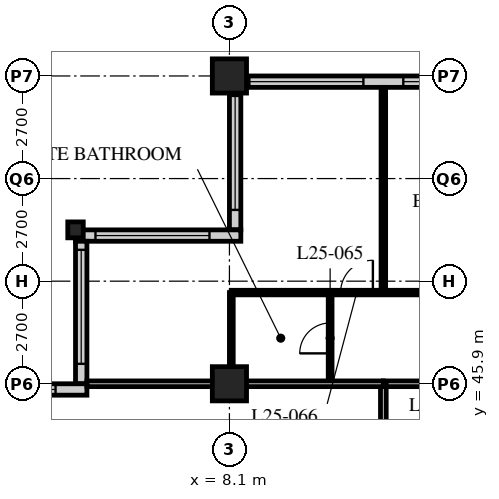
"""IFC4 building model, lengths in metres.
Left out: names, types, materials, properties, quantities, classifications, styles, units other than length and angle.
Written with IfcOpenShell. Run it as: python <this file> out.ifc"""

import sys

from ifc_helpers import new_model, si_unit, direction, frame, frame_2d, origin, origin_2d, place, context, subcontext, project, spatial, rectangle, hollow_rectangle, i_section, extrude, element, fill, save


model = new_model("IFC4")
c1 = context("Model", 3, precision=1e-05, world=origin(), true_north=direction((0.0, 1.0)))
c2 = subcontext(c1, "Body", "Model", "MODEL_VIEW")
j1 = project(units=[si_unit("LENGTHUNIT", "METRE"), si_unit("PLANEANGLEUNIT", "RADIAN")], contexts=[c1])
p1 = place(None, origin())
s1 = spatial("IfcSite", under=j1, at=p1, CompositionType="ELEMENT")
p2 = place(p1, origin())
s2 = spatial("IfcBuilding", under=s1, at=p2, CompositionType="ELEMENT")
p3 = place(p2, frame((0.0, 0.0, 103.4)))
s3 = spatial("IfcBuildingStorey", under=s2, at=p3, CompositionType="ELEMENT", Elevation=103.4)
p4 = place(p3, frame((4.05, 49.95, 0.0), z_axis=(0.0, 0.0, 1.0), x_axis=(1.0, 0.0, 0.0)))
e1 = element("IfcColumn", 1, at=p4, inside=s3, PredefinedType="COLUMN", context=c2, shape_type="SweptSolid", body=[
    extrude(i_section(OverallWidth=0.407, OverallDepth=0.419, WebThickness=0.031, FlangeThickness=0.049, FilletRadius=0.015, at=origin_2d()), origin(), (0.0, 0.0, 1.0), 3.4),
])
p5 = place(p3, frame((8.1, 45.9, 0.0), z_axis=(0.0, 0.0, 1.0), x_axis=(1.0, 0.0, 0.0)))
e2 = element("IfcColumn", 2, at=p5, inside=s3, PredefinedType="COLUMN", context=c2, shape_type="SweptSolid", body=[
    extrude(hollow_rectangle(XDim=0.9, YDim=0.9, WallThickness=0.1, at=origin_2d()), origin(), (0.0, 0.0, 1.0), 3.4),
])
p6 = place(p3, frame((8.1, 54.0, 0.0), z_axis=(0.0, 0.0, 1.0), x_axis=(1.0, 0.0, 0.0)))
e3 = element("IfcColumn", 3, at=p6, inside=s3, PredefinedType="COLUMN", context=c2, shape_type="SweptSolid", body=[
    extrude(hollow_rectangle(XDim=0.9, YDim=0.9, WallThickness=0.09, at=origin_2d()), origin(), (0.0, 0.0, 1.0), 3.4),
])
p7 = place(p3, frame((48.3, 53.85, 0.0), z_axis=(0.0, 0.0, 1.0), x_axis=(-1.0, 0.0, 0.0)))
e4 = element("IfcWall", 4, at=p7, inside=s3, PredefinedType="SOLIDWALL", context=c2, shape_type="SweptSolid", body=[
    extrude(rectangle(XDim=40.2, YDim=0.3, at=frame_2d((20.1, 0.0))), origin(), (0.0, 0.0, 1.0), 3.19),
])
p8 = place(p7, frame((0.225, 0.0, 0.9)))
e5 = element("IfcOpeningElement", 5, at=p8, cuts=e4, PredefinedType="OPENING", context=c2, shape_type="SweptSolid", body=[
    extrude(rectangle(XDim=3.0, YDim=2.0, at=frame_2d((1.5, 1.0))), frame((0.0, 0.16, 0.0), z_axis=(0.0, -1.0, 0.0), x_axis=(1.0, 0.0, 0.0)), (0.0, 0.0, 1.0), 0.32),
])
p9 = place(p7, frame((4.275, 0.0, 0.9)))
e6 = element("IfcOpeningElement", 6, at=p9, cuts=e4, PredefinedType="OPENING", context=c2, shape_type="SweptSolid", body=[
    extrude(rectangle(XDim=3.0, YDim=2.0, at=frame_2d((1.5, 1.0))), frame((0.0, 0.16, 0.0), z_axis=(0.0, -1.0, 0.0), x_axis=(1.0, 0.0, 0.0)), (0.0, 0.0, 1.0), 0.32),
])
p10 = place(p7, frame((8.325, 0.0, 0.9)))
e7 = element("IfcOpeningElement", 7, at=p10, cuts=e4, PredefinedType="OPENING", context=c2, shape_type="SweptSolid", body=[
    extrude(rectangle(XDim=3.0, YDim=2.0, at=frame_2d((1.5, 1.0))), frame((0.0, 0.16, 0.0), z_axis=(0.0, -1.0, 0.0), x_axis=(1.0, 0.0, 0.0)), (0.0, 0.0, 1.0), 0.32),
])
p11 = place(p7, frame((12.375, 0.0, 0.9)))
e8 = element("IfcOpeningElement", 8, at=p11, cuts=e4, PredefinedType="OPENING", context=c2, shape_type="SweptSolid", body=[
    extrude(rectangle(XDim=3.0, YDim=2.0, at=frame_2d((1.5, 1.0))), frame((0.0, 0.16, 0.0), z_axis=(0.0, -1.0, 0.0), x_axis=(1.0, 0.0, 0.0)), (0.0, 0.0, 1.0), 0.32),
])
p12 = place(p7, frame((16.425, 0.0, 0.9)))
e9 = element("IfcOpeningElement", 9, at=p12, cuts=e4, PredefinedType="OPENING", context=c2, shape_type="SweptSolid", body=[
    extrude(rectangle(XDim=3.0, YDim=2.0, at=frame_2d((1.5, 1.0))), frame((0.0, 0.16, 0.0), z_axis=(0.0, -1.0, 0.0), x_axis=(1.0, 0.0, 0.0)), (0.0, 0.0, 1.0), 0.32),
])
p13 = place(p7, frame((20.475, 0.0, 0.9)))
e10 = element("IfcOpeningElement", 10, at=p13, cuts=e4, PredefinedType="OPENING", context=c2, shape_type="SweptSolid", body=[
    extrude(rectangle(XDim=3.0, YDim=2.0, at=frame_2d((1.5, 1.0))), frame((0.0, 0.16, 0.0), z_axis=(0.0, -1.0, 0.0), x_axis=(1.0, 0.0, 0.0)), (0.0, 0.0, 1.0), 0.32),
])
p14 = place(p7, frame((24.525, 0.0, 0.9)))
e11 = element("IfcOpeningElement", 11, at=p14, cuts=e4, PredefinedType="OPENING", context=c2, shape_type="SweptSolid", body=[
    extrude(rectangle(XDim=3.0, YDim=2.0, at=frame_2d((1.5, 1.0))), frame((0.0, 0.16, 0.0), z_axis=(0.0, -1.0, 0.0), x_axis=(1.0, 0.0, 0.0)), (0.0, 0.0, 1.0), 0.32),
])
p15 = place(p7, frame((28.575, 0.0, 0.9)))
e12 = element("IfcOpeningElement", 12, at=p15, cuts=e4, PredefinedType="OPENING", context=c2, shape_type="SweptSolid", body=[
    extrude(rectangle(XDim=3.0, YDim=2.0, at=frame_2d((1.5, 1.0))), frame((0.0, 0.16, 0.0), z_axis=(0.0, -1.0, 0.0), x_axis=(1.0, 0.0, 0.0)), (0.0, 0.0, 1.0), 0.32),
])
p16 = place(p7, frame((32.625, 0.0, 0.9)))
e13 = element("IfcOpeningElement", 13, at=p16, cuts=e4, PredefinedType="OPENING", context=c2, shape_type="SweptSolid", body=[
    extrude(rectangle(XDim=3.0, YDim=2.0, at=frame_2d((1.5, 1.0))), frame((0.0, 0.16, 0.0), z_axis=(0.0, -1.0, 0.0), x_axis=(1.0, 0.0, 0.0)), (0.0, 0.0, 1.0), 0.32),
])
p17 = place(p7, frame((36.675, 0.0, 0.9)))
e14 = element("IfcOpeningElement", 14, at=p17, cuts=e4, PredefinedType="OPENING", context=c2, shape_type="SweptSolid", body=[
    extrude(rectangle(XDim=3.0, YDim=2.0, at=frame_2d((1.5, 1.0))), frame((0.0, 0.16, 0.0), z_axis=(0.0, -1.0, 0.0), x_axis=(1.0, 0.0, 0.0)), (0.0, 0.0, 1.0), 0.32),
])
p18 = place(p3, frame((8.25, 53.7, 0.0), z_axis=(0.0, 0.0, 1.0), x_axis=(0.0, -1.0, 0.0)))
e15 = element("IfcWall", 15, at=p18, inside=s3, PredefinedType="SOLIDWALL", context=c2, shape_type="SweptSolid", body=[
    extrude(rectangle(XDim=3.75, YDim=0.3, at=frame_2d((1.875, 0.0))), origin(), (0.0, 0.0, 1.0), 2.64),
])
p19 = place(p18, frame((0.225, 0.0, 0.9)))
e16 = element("IfcOpeningElement", 16, at=p19, cuts=e15, PredefinedType="OPENING", context=c2, shape_type="SweptSolid", body=[
    extrude(rectangle(XDim=3.0, YDim=1.5, at=frame_2d((1.5, 0.75))), frame((0.0, 0.16, 0.0), z_axis=(0.0, -1.0, 0.0), x_axis=(1.0, 0.0, 0.0)), (0.0, 0.0, 1.0), 0.32),
])
p20 = place(p3, frame((8.4, 49.8, 0.0), z_axis=(0.0, 0.0, 1.0), x_axis=(-1.0, 0.0, 0.0)))
e17 = element("IfcWall", 17, at=p20, inside=s3, PredefinedType="SOLIDWALL", context=c2, shape_type="SweptSolid", body=[
    extrude(rectangle(XDim=4.35, YDim=0.3, at=frame_2d((2.175, 0.0))), origin(), (0.0, 0.0, 1.0), 3.19),
])
p21 = place(p20, frame((0.825, 0.0, 0.9)))
e18 = element("IfcOpeningElement", 18, at=p21, cuts=e17, PredefinedType="OPENING", context=c2, shape_type="SweptSolid", body=[
    extrude(rectangle(XDim=3.0, YDim=1.5, at=frame_2d((1.5, 0.75))), frame((0.0, 0.16, 0.0), z_axis=(0.0, -1.0, 0.0), x_axis=(1.0, 0.0, 0.0)), (0.0, 0.0, 1.0), 0.32),
])
p22 = place(p3, frame((4.2, 49.65, 0.0), z_axis=(0.0, 0.0, 1.0), x_axis=(0.0, -1.0, 0.0)))
e19 = element("IfcWall", 19, at=p22, inside=s3, PredefinedType="SOLIDWALL", context=c2, shape_type="SweptSolid", body=[
    extrude(rectangle(XDim=3.75, YDim=0.3, at=frame_2d((1.875, 0.0))), origin(), (0.0, 0.0, 1.0), 3.19),
])
p23 = place(p22, frame((0.225, 0.0, 0.9)))
e20 = element("IfcOpeningElement", 20, at=p23, cuts=e19, PredefinedType="OPENING", context=c2, shape_type="SweptSolid", body=[
    extrude(rectangle(XDim=3.0, YDim=1.5, at=frame_2d((1.5, 0.75))), frame((0.0, 0.16, 0.0), z_axis=(0.0, -1.0, 0.0), x_axis=(1.0, 0.0, 0.0)), (0.0, 0.0, 1.0), 0.32),
])
p24 = place(p3, frame((4.35, 45.75, 0.0), z_axis=(0.0, 0.0, 1.0), x_axis=(-1.0, 0.0, 0.0)))
e21 = element("IfcWall", 21, at=p24, inside=s3, PredefinedType="SOLIDWALL", context=c2, shape_type="SweptSolid", body=[
    extrude(rectangle(XDim=4.35, YDim=0.3, at=frame_2d((2.175, 0.0))), origin(), (0.0, 0.0, 1.0), 3.19),
])
p25 = place(p24, frame((0.825, 0.0, 0.9)))
e22 = element("IfcOpeningElement", 22, at=p25, cuts=e21, PredefinedType="OPENING", context=c2, shape_type="SweptSolid", body=[
    extrude(rectangle(XDim=3.0, YDim=1.5, at=frame_2d((1.5, 0.75))), frame((0.0, 0.16, 0.0), z_axis=(0.0, -1.0, 0.0), x_axis=(1.0, 0.0, 0.0)), (0.0, 0.0, 1.0), 0.32),
])
p26 = place(p3, frame((12.15, 45.9, 0.0), z_axis=(0.0, 0.0, 1.0), x_axis=(1.0, 0.0, 0.0)))
e23 = element("IfcWall", 23, at=p26, inside=s3, PredefinedType="PARTITIONING", context=c2, shape_type="SweptSolid", body=[
    extrude(rectangle(XDim=32.4, YDim=0.15, at=frame_2d((16.2, 0.0))), origin(), (0.0, 0.0, 1.0), 2.578),
])
p27 = place(p26, frame((9.5, 0.0, 0.0)))
e24 = element("IfcOpeningElement", 24, at=p27, cuts=e23, PredefinedType="OPENING", context=c2, shape_type="SweptSolid", body=[
    extrude(rectangle(XDim=1.0, YDim=2.1, at=frame_2d((0.5, 1.05))), frame((0.0, 0.085, 0.0), z_axis=(0.0, -1.0, 0.0), x_axis=(1.0, 0.0, 0.0)), (0.0, 0.0, 1.0), 0.17),
])
p28 = place(p26, frame((17.6, 0.0, 0.0)))
e25 = element("IfcOpeningElement", 25, at=p28, cuts=e23, PredefinedType="OPENING", context=c2, shape_type="SweptSolid", body=[
    extrude(rectangle(XDim=1.0, YDim=2.1, at=frame_2d((0.5, 1.05))), frame((0.0, 0.085, 0.0), z_axis=(0.0, -1.0, 0.0), x_axis=(1.0, 0.0, 0.0)), (0.0, 0.0, 1.0), 0.17),
])
p29 = place(p26, frame((25.7, 0.0, 0.0)))
e26 = element("IfcOpeningElement", 26, at=p29, cuts=e23, PredefinedType="OPENING", context=c2, shape_type="SweptSolid", body=[
    extrude(rectangle(XDim=1.0, YDim=2.1, at=frame_2d((0.5, 1.05))), frame((0.0, 0.085, 0.0), z_axis=(0.0, -1.0, 0.0), x_axis=(1.0, 0.0, 0.0)), (0.0, 0.0, 1.0), 0.17),
])
p30 = place(p26, frame((29.875, 0.0, 0.0)))
e27 = element("IfcOpeningElement", 27, at=p30, cuts=e23, PredefinedType="OPENING", context=c2, shape_type="SweptSolid", body=[
    extrude(rectangle(XDim=1.0, YDim=2.1, at=frame_2d((0.5, 1.05))), frame((0.0, 0.085, 0.0), z_axis=(0.0, -1.0, 0.0), x_axis=(1.0, 0.0, 0.0)), (0.0, 0.0, 1.0), 0.17),
])
p31 = place(p26, frame((1.525, 0.0, 0.0)))
e28 = element("IfcOpeningElement", 28, at=p31, cuts=e23, PredefinedType="OPENING", context=c2, shape_type="SweptSolid", body=[
    extrude(rectangle(XDim=1.0, YDim=2.1, at=frame_2d((0.5, 1.05))), frame((0.0, 0.085, 0.0), z_axis=(0.0, -1.0, 0.0), x_axis=(1.0, 0.0, 0.0)), (0.0, 0.0, 1.0), 0.17),
])
p32 = place(p3, frame((12.15, 21.6, 0.0), z_axis=(0.0, 0.0, 1.0), x_axis=(0.0, 1.0, 0.0)))
e29 = element("IfcWall", 29, at=p32, inside=s3, PredefinedType="PARTITIONING", context=c2, shape_type="SweptSolid", body=[
    extrude(rectangle(XDim=24.3, YDim=0.15, at=frame_2d((12.15, 0.0))), origin(), (0.0, 0.0, 1.0), 3.19),
])
p33 = place(p32, frame((5.45, 0.0, 0.0)))
e30 = element("IfcOpeningElement", 30, at=p33, cuts=e29, PredefinedType="OPENING", context=c2, shape_type="SweptSolid", body=[
    extrude(rectangle(XDim=1.0, YDim=2.1, at=frame_2d((0.5, 1.05))), frame((0.0, 0.085, 0.0), z_axis=(0.0, -1.0, 0.0), x_axis=(1.0, 0.0, 0.0)), (0.0, 0.0, 1.0), 0.17),
])
p34 = place(p32, frame((13.55, 0.0, 0.0)))
e31 = element("IfcOpeningElement", 31, at=p34, cuts=e29, PredefinedType="OPENING", context=c2, shape_type="SweptSolid", body=[
    extrude(rectangle(XDim=1.0, YDim=2.1, at=frame_2d((0.5, 1.05))), frame((0.0, 0.085, 0.0), z_axis=(0.0, -1.0, 0.0), x_axis=(1.0, 0.0, 0.0)), (0.0, 0.0, 1.0), 0.17),
])
p35 = place(p32, frame((21.65, 0.0, 0.0)))
e32 = element("IfcOpeningElement", 32, at=p35, cuts=e29, PredefinedType="OPENING", context=c2, shape_type="SweptSolid", body=[
    extrude(rectangle(XDim=1.0, YDim=2.1, at=frame_2d((0.5, 1.05))), frame((0.0, 0.085, 0.0), z_axis=(0.0, -1.0, 0.0), x_axis=(1.0, 0.0, 0.0)), (0.0, 0.0, 1.0), 0.17),
])
p36 = place(p3, frame((10.75, 45.9, 0.0), z_axis=(0.0, 0.0, 1.0), x_axis=(0.0, 1.0, 0.0)))
e33 = element("IfcWall", 33, at=p36, inside=s3, PredefinedType="PARTITIONING", context=c2, shape_type="SweptSolid", body=[
    extrude(rectangle(XDim=2.4, YDim=0.1, at=frame_2d((1.2, 0.0))), origin(), (0.0, 0.0, 1.0), 3.19),
])
p37 = place(p36, frame((0.8, 0.0, 0.0)))
e34 = element("IfcOpeningElement", 34, at=p37, cuts=e33, PredefinedType="OPENING", context=c2, shape_type="SweptSolid", body=[
    extrude(rectangle(XDim=0.8, YDim=2.1, at=frame_2d((0.4, 1.05))), frame((0.0, 0.06, 0.0), z_axis=(0.0, -1.0, 0.0), x_axis=(1.0, 0.0, 0.0)), (0.0, 0.0, 1.0), 0.12),
])
p38 = place(p3, frame((8.15, 45.9, 0.0), z_axis=(0.0, 0.0, 1.0), x_axis=(0.0, 1.0, 0.0)))
e35 = element("IfcWall", 35, at=p38, inside=s3, PredefinedType="PARTITIONING", context=c2, shape_type="SweptSolid", body=[
    extrude(rectangle(XDim=2.4, YDim=0.1, at=frame_2d((1.2, 0.0))), origin(), (0.0, 0.0, 1.0), 2.64),
])
p39 = place(p3, frame((8.15, 48.3, 0.0), z_axis=(0.0, 0.0, 1.0), x_axis=(1.0, 0.0, 0.0)))
e36 = element("IfcWall", 36, at=p39, inside=s3, PredefinedType="PARTITIONING", context=c2, shape_type="SweptSolid", body=[
    extrude(rectangle(XDim=8.05, YDim=0.12, at=frame_2d((4.025, 0.0))), origin(), (0.0, 0.0, 1.0), 3.19),
])
p40 = place(p39, frame((6.725, 0.0, 0.0)))
e37 = element("IfcOpeningElement", 37, at=p40, cuts=e36, PredefinedType="OPENING", context=c2, shape_type="SweptSolid", body=[
    extrude(rectangle(XDim=0.85, YDim=2.1, at=frame_2d((0.425, 1.05))), frame((0.0, 0.07, 0.0), z_axis=(0.0, -1.0, 0.0), x_axis=(1.0, 0.0, 0.0)), (0.0, 0.0, 1.0), 0.14),
])
p41 = place(p39, frame((2.875, 0.0, 0.0)))
e38 = element("IfcOpeningElement", 38, at=p41, cuts=e36, PredefinedType="OPENING", context=c2, shape_type="SweptSolid", body=[
    extrude(rectangle(XDim=0.85, YDim=2.1, at=frame_2d((0.425, 1.05))), frame((0.0, 0.07, 0.0), z_axis=(0.0, -1.0, 0.0), x_axis=(1.0, 0.0, 0.0)), (0.0, 0.0, 1.0), 0.14),
])
p42 = place(p3, frame((12.15, 48.3, 0.0), z_axis=(0.0, 0.0, 1.0), x_axis=(0.0, 1.0, 0.0)))
e39 = element("IfcWall", 39, at=p42, inside=s3, PredefinedType="PARTITIONING", context=c2, shape_type="SweptSolid", body=[
    extrude(rectangle(XDim=5.4, YDim=0.12, at=frame_2d((2.7, 0.0))), origin(), (0.0, 0.0, 1.0), 3.19),
])
p43 = place(p3, frame((4.35, 45.9, 0.0), z_axis=(0.0, 0.0, 1.0), x_axis=(1.0, 0.0, 0.0)))
e40 = element("IfcWall", 40, at=p43, inside=s3, PredefinedType="PARTITIONING", context=c2, shape_type="SweptSolid", body=[
    extrude(rectangle(XDim=7.8, YDim=0.15, at=frame_2d((3.9, 0.0))), origin(), (0.0, 0.0, 1.0), 2.578),
])
p44 = place(p16, origin())
e41 = element("IfcWindow", 41, at=p44, inside=s3, PartitioningType="SINGLE_PANEL", PredefinedType="WINDOW", context=c2, shape_type="SweptSolid", body=[
    extrude(rectangle(XDim=3.0, YDim=2.0, at=frame_2d((1.5, 1.0))), frame((0.0, 0.03, 0.0), z_axis=(0.0, -1.0, 0.0), x_axis=(1.0, 0.0, 0.0)), (0.0, 0.0, 1.0), 0.06),
])
fill(e13, e41)
p45 = place(p17, origin())
e42 = element("IfcWindow", 42, at=p45, inside=s3, PartitioningType="SINGLE_PANEL", PredefinedType="WINDOW", context=c2, shape_type="SweptSolid", body=[
    extrude(rectangle(XDim=3.0, YDim=2.0, at=frame_2d((1.5, 1.0))), frame((0.0, 0.03, 0.0), z_axis=(0.0, -1.0, 0.0), x_axis=(1.0, 0.0, 0.0)), (0.0, 0.0, 1.0), 0.06),
])
fill(e14, e42)
p46 = place(p19, origin())
e43 = element("IfcWindow", 43, at=p46, inside=s3, PartitioningType="SINGLE_PANEL", PredefinedType="WINDOW", context=c2, shape_type="SweptSolid", body=[
    extrude(rectangle(XDim=3.0, YDim=1.5, at=frame_2d((1.5, 0.75))), frame((0.0, 0.03, 0.0), z_axis=(0.0, -1.0, 0.0), x_axis=(1.0, 0.0, 0.0)), (0.0, 0.0, 1.0), 0.06),
])
fill(e16, e43)
p47 = place(p21, origin())
e44 = element("IfcWindow", 44, at=p47, inside=s3, PartitioningType="SINGLE_PANEL", PredefinedType="WINDOW", context=c2, shape_type="SweptSolid", body=[
    extrude(rectangle(XDim=3.0, YDim=1.5, at=frame_2d((1.5, 0.75))), frame((0.0, 0.03, 0.0), z_axis=(0.0, -1.0, 0.0), x_axis=(1.0, 0.0, 0.0)), (0.0, 0.0, 1.0), 0.06),
])
fill(e18, e44)
p48 = place(p23, origin())
e45 = element("IfcWindow", 45, at=p48, inside=s3, PartitioningType="SINGLE_PANEL", PredefinedType="WINDOW", context=c2, shape_type="SweptSolid", body=[
    extrude(rectangle(XDim=3.0, YDim=1.5, at=frame_2d((1.5, 0.75))), frame((0.0, 0.03, 0.0), z_axis=(0.0, -1.0, 0.0), x_axis=(1.0, 0.0, 0.0)), (0.0, 0.0, 1.0), 0.06),
])
fill(e20, e45)
p49 = place(p25, origin())
e46 = element("IfcWindow", 46, at=p49, inside=s3, PartitioningType="SINGLE_PANEL", PredefinedType="WINDOW", context=c2, shape_type="SweptSolid", body=[
    extrude(rectangle(XDim=3.0, YDim=1.5, at=frame_2d((1.5, 0.75))), frame((0.0, 0.03, 0.0), z_axis=(0.0, -1.0, 0.0), x_axis=(1.0, 0.0, 0.0)), (0.0, 0.0, 1.0), 0.06),
])
fill(e22, e46)
p50 = place(p37, origin())
e47 = element("IfcDoor", 47, at=p50, inside=s3, OperationType="SINGLE_SWING_LEFT", PredefinedType="DOOR", context=c2, shape_type="SweptSolid", body=[
    extrude(rectangle(XDim=0.8, YDim=2.1, at=frame_2d((0.4, 1.05))), frame((0.0, 0.025, 0.0), z_axis=(0.0, -1.0, 0.0), x_axis=(1.0, 0.0, 0.0)), (0.0, 0.0, 1.0), 0.05),
])
fill(e34, e47)
p51 = place(p41, origin())
e48 = element("IfcDoor", 48, at=p51, inside=s3, OperationType="SINGLE_SWING_RIGHT", PredefinedType="DOOR", context=c2, shape_type="SweptSolid", body=[
    extrude(rectangle(XDim=0.85, YDim=2.1, at=frame_2d((0.425, 1.05))), frame((0.0, 0.025, 0.0), z_axis=(0.0, -1.0, 0.0), x_axis=(1.0, 0.0, 0.0)), (0.0, 0.0, 1.0), 0.05),
])
fill(e38, e48)
save(model, sys.argv[1])
